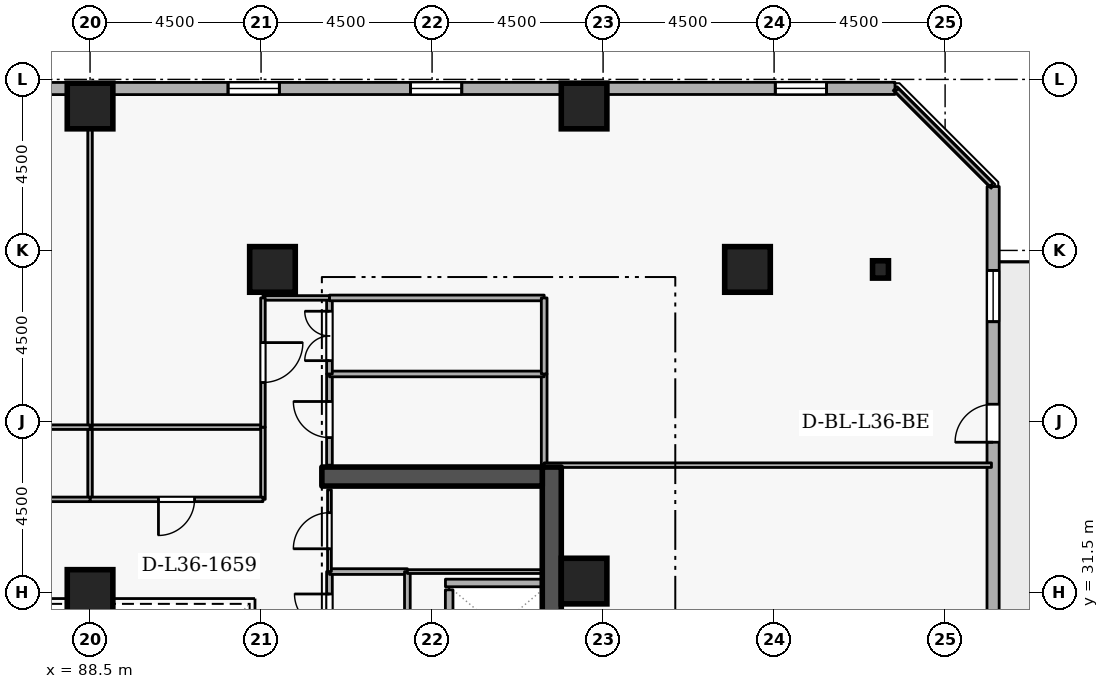
"""IFC4 building model, lengths in metres.
Left out: names, types, materials, properties, quantities, classifications, styles, units other than length and angle.
Written with IfcOpenShell. Run it as: python <this file> out.ifc"""

import sys

from ifc_helpers import new_model, si_unit, direction, frame, frame_2d, origin, origin_2d, place, context, subcontext, project, spatial, rectangle, i_section, extrude, element, fill, save


model = new_model("IFC4")
c1 = context("Model", 3, precision=1e-05, world=origin(), true_north=direction((0.0, 1.0)))
c2 = subcontext(c1, "Body", "Model", "MODEL_VIEW")
j1 = project(units=[si_unit("LENGTHUNIT", "METRE"), si_unit("PLANEANGLEUNIT", "RADIAN")], contexts=[c1])
p1 = place(None, origin())
s1 = spatial("IfcSite", under=j1, at=p1, CompositionType="ELEMENT")
p2 = place(p1, origin())
s2 = spatial("IfcBuilding", under=s1, at=p2, CompositionType="ELEMENT")
p3 = place(p2, frame((0.0, 0.0, 137.7)))
s3 = spatial("IfcBuildingStorey", under=s2, at=p3, CompositionType="ELEMENT", Elevation=137.7)
p4 = place(p3, frame((100.65, 19.2, 0.0), z_axis=(0.0, 0.0, 1.0), x_axis=(0.0, 1.0, 0.0)))
e1 = element("IfcWall", 1, at=p4, inside=s3, PredefinedType="SHEAR", context=c2, shape_type="SweptSolid", body=[
    extrude(rectangle(XDim=15.6, YDim=0.5, at=frame_2d((7.8, 0.0))), origin(), (0.0, 0.0, 1.0), 3.6),
])
p5 = place(p3, frame((94.6, 34.55, 0.0), z_axis=(0.0, 0.0, 1.0), x_axis=(1.0, 0.0, 0.0)))
e2 = element("IfcWall", 2, at=p5, inside=s3, PredefinedType="SHEAR", context=c2, shape_type="SweptSolid", body=[
    extrude(rectangle(XDim=5.8, YDim=0.5, at=frame_2d((2.9, 0.0))), origin(), (0.0, 0.0, 1.0), 3.6),
])
for number, where, z_axis, x_axis in (
    (3, (105.8, 40.0, 0.0), (0.0, 0.0, 1.0), (1.0, 0.0, 0.0)),
    (4, (101.5, 44.3, 0.0), (0.0, 0.0, 1.0), (1.0, 0.0, 0.0)),
    (5, (88.5, 44.3, 0.0), (0.0, 0.0, 1.0), (1.0, 0.0, 0.0)),
    (6, (93.3, 40.0, 0.0), (0.0, 0.0, 1.0), (1.0, 0.0, 0.0)),
    (7, (101.5, 31.8, 0.0), (0.0, 0.0, 1.0), (1.0, 0.0, 0.0)),
    (8, (88.5, 31.5, 0.0), (0.0, 0.0, 1.0), (1.0, 0.0, 0.0)),
):
    element("IfcColumn", number, at=place(p3, frame(where, z_axis=z_axis, x_axis=x_axis)), inside=s3, PredefinedType="COLUMN", context=c2, shape_type="SweptSolid", body=[
        extrude(rectangle(XDim=1.2, YDim=1.2, at=origin_2d()), origin(), (0.0, 0.0, 1.0), 3.6),
    ])
p6 = place(p3, frame((109.3, 40.0, 0.0), z_axis=(0.0, 0.0, 1.0), x_axis=(1.0, 0.0, 0.0)))
e9 = element("IfcColumn", 9, at=p6, inside=s3, PredefinedType="COLUMN", context=c2, shape_type="SweptSolid", body=[
    extrude(i_section(OverallWidth=0.418, OverallDepth=0.456, WebThickness=0.042, FlangeThickness=0.067, FilletRadius=0.015, at=origin_2d()), origin(), (0.0, 0.0, 1.0), 3.6),
])
p7 = place(p3, frame((112.257, 8.025, 0.0), z_axis=(0.0, 0.0, 1.0), x_axis=(0.000214431216, 0.99999997701, 0.0)))
e10 = element("IfcWall", 10, at=p7, inside=s3, PredefinedType="STANDARD", context=c2, shape_type="SweptSolid", body=[
    extrude(rectangle(XDim=34.156, YDim=0.32, at=frame_2d((17.078, 0.0))), origin(), (0.0, 0.0, 1.0), 2.66),
])
p8 = place(p7, frame((27.428, 0.0, 0.0)))
e11 = element("IfcOpeningElement", 11, at=p8, cuts=e10, PredefinedType="OPENING", context=c2, shape_type="SweptSolid", body=[
    extrude(rectangle(XDim=1.0, YDim=2.08, at=frame_2d((0.5, 1.04))), frame((0.0, 0.17, 0.0), z_axis=(0.0, -1.0, 0.0), x_axis=(1.0, 0.0, 0.0)), (0.0, 0.0, 1.0), 0.34),
])
p9 = place(p7, frame((1.8, 0.0, 0.72)))
e12 = element("IfcOpeningElement", 12, at=p9, cuts=e10, PredefinedType="OPENING", context=c2, shape_type="SweptSolid", body=[
    extrude(rectangle(XDim=1.35, YDim=1.05, at=frame_2d((0.675, 0.525))), frame((0.0, 0.17, 0.0), z_axis=(0.0, -1.0, 0.0), x_axis=(1.0, 0.0, 0.0)), (0.0, 0.0, 1.0), 0.34),
])
p10 = place(p7, frame((6.6, 0.0, 0.72)))
e13 = element("IfcOpeningElement", 13, at=p10, cuts=e10, PredefinedType="OPENING", context=c2, shape_type="SweptSolid", body=[
    extrude(rectangle(XDim=1.35, YDim=1.05, at=frame_2d((0.675, 0.525))), frame((0.0, 0.17, 0.0), z_axis=(0.0, -1.0, 0.0), x_axis=(1.0, 0.0, 0.0)), (0.0, 0.0, 1.0), 0.34),
])
p11 = place(p7, frame((11.4, 0.0, 0.72)))
e14 = element("IfcOpeningElement", 14, at=p11, cuts=e10, PredefinedType="OPENING", context=c2, shape_type="SweptSolid", body=[
    extrude(rectangle(XDim=1.35, YDim=1.05, at=frame_2d((0.675, 0.525))), frame((0.0, 0.17, 0.0), z_axis=(0.0, -1.0, 0.0), x_axis=(1.0, 0.0, 0.0)), (0.0, 0.0, 1.0), 0.34),
])
p12 = place(p7, frame((16.2, 0.0, 0.72)))
e15 = element("IfcOpeningElement", 15, at=p12, cuts=e10, PredefinedType="OPENING", context=c2, shape_type="SweptSolid", body=[
    extrude(rectangle(XDim=1.35, YDim=1.05, at=frame_2d((0.675, 0.525))), frame((0.0, 0.17, 0.0), z_axis=(0.0, -1.0, 0.0), x_axis=(1.0, 0.0, 0.0)), (0.0, 0.0, 1.0), 0.34),
])
p13 = place(p7, frame((21.0, 0.0, 0.72)))
e16 = element("IfcOpeningElement", 16, at=p13, cuts=e10, PredefinedType="OPENING", context=c2, shape_type="SweptSolid", body=[
    extrude(rectangle(XDim=1.35, YDim=1.05, at=frame_2d((0.675, 0.525))), frame((0.0, 0.17, 0.0), z_axis=(0.0, -1.0, 0.0), x_axis=(1.0, 0.0, 0.0)), (0.0, 0.0, 1.0), 0.34),
])
p14 = place(p7, frame((30.6, 0.0, 0.72)))
e17 = element("IfcOpeningElement", 17, at=p14, cuts=e10, PredefinedType="OPENING", context=c2, shape_type="SweptSolid", body=[
    extrude(rectangle(XDim=1.35, YDim=1.05, at=frame_2d((0.675, 0.525))), frame((0.0, 0.17, 0.0), z_axis=(0.0, -1.0, 0.0), x_axis=(1.0, 0.0, 0.0)), (0.0, 0.0, 1.0), 0.34),
])
p15 = place(p3, frame((109.681, 44.765, 0.0), z_axis=(0.0, 0.0, 1.0), x_axis=(-0.99999997701, -0.000214431216, 0.0)))
e18 = element("IfcWall", 18, at=p15, inside=s3, PredefinedType="STANDARD", context=c2, shape_type="SweptSolid", body=[
    extrude(rectangle(XDim=34.156, YDim=0.32, at=frame_2d((17.078, 0.0))), origin(), (0.0, 0.0, 1.0), 2.66),
])
p16 = place(p15, frame((1.8, 0.0, 0.72)))
e19 = element("IfcOpeningElement", 19, at=p16, cuts=e18, PredefinedType="OPENING", context=c2, shape_type="SweptSolid", body=[
    extrude(rectangle(XDim=1.35, YDim=1.05, at=frame_2d((0.675, 0.525))), frame((0.0, 0.17, 0.0), z_axis=(0.0, -1.0, 0.0), x_axis=(1.0, 0.0, 0.0)), (0.0, 0.0, 1.0), 0.34),
])
p17 = place(p15, frame((11.4, 0.0, 0.72)))
e20 = element("IfcOpeningElement", 20, at=p17, cuts=e18, PredefinedType="OPENING", context=c2, shape_type="SweptSolid", body=[
    extrude(rectangle(XDim=1.35, YDim=1.05, at=frame_2d((0.675, 0.525))), frame((0.0, 0.17, 0.0), z_axis=(0.0, -1.0, 0.0), x_axis=(1.0, 0.0, 0.0)), (0.0, 0.0, 1.0), 0.34),
])
p18 = place(p15, frame((16.2, 0.0, 0.72)))
e21 = element("IfcOpeningElement", 21, at=p18, cuts=e18, PredefinedType="OPENING", context=c2, shape_type="SweptSolid", body=[
    extrude(rectangle(XDim=1.35, YDim=1.05, at=frame_2d((0.675, 0.525))), frame((0.0, 0.17, 0.0), z_axis=(0.0, -1.0, 0.0), x_axis=(1.0, 0.0, 0.0)), (0.0, 0.0, 1.0), 0.34),
])
p19 = place(p15, frame((25.8, 0.0, 0.72)))
e22 = element("IfcOpeningElement", 22, at=p19, cuts=e18, PredefinedType="OPENING", context=c2, shape_type="SweptSolid", body=[
    extrude(rectangle(XDim=1.35, YDim=1.05, at=frame_2d((0.675, 0.525))), frame((0.0, 0.17, 0.0), z_axis=(0.0, -1.0, 0.0), x_axis=(1.0, 0.0, 0.0)), (0.0, 0.0, 1.0), 0.34),
])
p20 = place(p15, frame((30.6, 0.0, 0.72)))
e23 = element("IfcOpeningElement", 23, at=p20, cuts=e18, PredefinedType="OPENING", context=c2, shape_type="SweptSolid", body=[
    extrude(rectangle(XDim=1.35, YDim=1.05, at=frame_2d((0.675, 0.525))), frame((0.0, 0.17, 0.0), z_axis=(0.0, -1.0, 0.0), x_axis=(1.0, 0.0, 0.0)), (0.0, 0.0, 1.0), 0.34),
])
p21 = place(p3, frame((97.95, 31.57, 0.0), z_axis=(0.0, 0.0, 1.0), x_axis=(0.0, -1.0, 0.0)))
e24 = element("IfcWall", 24, at=p21, inside=s3, PredefinedType="STANDARD", context=c2, shape_type="SweptSolid", body=[
    extrude(rectangle(XDim=1.99, YDim=0.2, at=frame_2d((0.995, 0.0))), origin(), (0.0, 0.0, 1.0), 3.26),
])
p22 = place(p3, frame((97.852, 31.75, 0.0), z_axis=(0.0, 0.0, 1.0), x_axis=(1.0, 0.0, 0.0)))
e25 = element("IfcWall", 25, at=p22, inside=s3, PredefinedType="STANDARD", context=c2, shape_type="SweptSolid", body=[
    extrude(rectangle(XDim=2.536, YDim=0.2, at=frame_2d((1.268, 0.0))), origin(), (0.0, 0.0, 1.0), 3.26),
])
p23 = place(p3, frame((94.8, 29.95, 0.0), z_axis=(0.0, 0.0, 1.0), x_axis=(0.0, 1.0, 0.0)))
e26 = element("IfcWall", 26, at=p23, inside=s3, PredefinedType="PARTITIONING", context=c2, shape_type="SweptSolid", body=[
    extrude(rectangle(XDim=2.1, YDim=0.15, at=frame_2d((1.05, 0.0))), origin(), (0.0, 0.0, 1.0), 3.26),
])
p24 = place(p23, frame((0.59, 0.0, 0.0)))
e27 = element("IfcOpeningElement", 27, at=p24, cuts=e26, PredefinedType="OPENING", context=c2, shape_type="SweptSolid", body=[
    extrude(rectangle(XDim=0.92, YDim=2.08, at=frame_2d((0.46, 1.04))), frame((0.0, 0.085, 0.0), z_axis=(0.0, -1.0, 0.0), x_axis=(1.0, 0.0, 0.0)), (0.0, 0.0, 1.0), 0.17),
])
p25 = place(p3, frame((94.8, 32.05, 0.0), z_axis=(0.0, 0.0, 1.0), x_axis=(1.0, 0.0, 0.0)))
e28 = element("IfcWall", 28, at=p25, inside=s3, PredefinedType="PARTITIONING", context=c2, shape_type="SweptSolid", body=[
    extrude(rectangle(XDim=2.05, YDim=0.15, at=frame_2d((1.025, 0.0))), origin(), (0.0, 0.0, 1.0), 3.26),
])
p26 = place(p3, frame((96.85, 32.05, 0.0), z_axis=(0.0, 0.0, 1.0), x_axis=(0.0, -1.0, 0.0)))
e29 = element("IfcWall", 29, at=p26, inside=s3, PredefinedType="PARTITIONING", context=c2, shape_type="SweptSolid", body=[
    extrude(rectangle(XDim=2.1, YDim=0.15, at=frame_2d((1.05, 0.0))), origin(), (0.0, 0.0, 1.0), 3.26),
])
p27 = place(p3, frame((94.8, 32.05, 0.0), z_axis=(0.0, 0.0, 1.0), x_axis=(0.0, 1.0, 0.0)))
e30 = element("IfcWall", 30, at=p27, inside=s3, PredefinedType="PARTITIONING", context=c2, shape_type="SweptSolid", body=[
    extrude(rectangle(XDim=2.15, YDim=0.1, at=frame_2d((1.075, 0.0))), origin(), (0.0, 0.0, 1.0), 3.26),
])
p28 = place(p27, frame((0.6, 0.0, 0.0)))
e31 = element("IfcOpeningElement", 31, at=p28, cuts=e30, PredefinedType="OPENING", context=c2, shape_type="SweptSolid", body=[
    extrude(rectangle(XDim=0.95, YDim=2.1, at=frame_2d((0.475, 1.05))), frame((0.0, 0.06, 0.0), z_axis=(0.0, -1.0, 0.0), x_axis=(1.0, 0.0, 0.0)), (0.0, 0.0, 1.0), 0.12),
])
p29 = place(p3, frame((100.4, 32.05, 0.0), z_axis=(0.0, 0.0, 1.0), x_axis=(-1.0, 0.0, 0.0)))
e32 = element("IfcWall", 32, at=p29, inside=s3, PredefinedType="PARTITIONING", context=c2, shape_type="SweptSolid", body=[
    extrude(rectangle(XDim=3.55, YDim=0.1, at=frame_2d((1.775, 0.0))), origin(), (0.0, 0.0, 1.0), 3.26),
])
p30 = place(p3, frame((100.45, 37.25, 0.0), z_axis=(0.0, 0.0, 1.0), x_axis=(0.0, -1.0, 0.0)))
e33 = element("IfcWall", 33, at=p30, inside=s3, PredefinedType="PARTITIONING", context=c2, shape_type="SweptSolid", body=[
    extrude(rectangle(XDim=2.4, YDim=0.15, at=frame_2d((1.2, 0.0))), origin(), (0.0, 0.0, 1.0), 3.26),
])
p31 = place(p3, frame((94.8, 34.85, 0.0), z_axis=(0.0, 0.0, 1.0), x_axis=(0.0, 1.0, 0.0)))
e34 = element("IfcWall", 34, at=p31, inside=s3, PredefinedType="PARTITIONING", context=c2, shape_type="SweptSolid", body=[
    extrude(rectangle(XDim=2.4, YDim=0.15, at=frame_2d((1.2, 0.0))), origin(), (0.0, 0.0, 1.0), 3.26),
])
p32 = place(p31, frame((0.725, 0.0, 0.0)))
e35 = element("IfcOpeningElement", 35, at=p32, cuts=e34, PredefinedType="OPENING", context=c2, shape_type="SweptSolid", body=[
    extrude(rectangle(XDim=0.95, YDim=2.1, at=frame_2d((0.475, 1.05))), frame((0.0, 0.085, 0.0), z_axis=(0.0, -1.0, 0.0), x_axis=(1.0, 0.0, 0.0)), (0.0, 0.0, 1.0), 0.17),
])
p33 = place(p3, frame((94.8, 37.25, 0.0), z_axis=(0.0, 0.0, 1.0), x_axis=(1.0, 0.0, 0.0)))
e36 = element("IfcWall", 36, at=p33, inside=s3, PredefinedType="PARTITIONING", context=c2, shape_type="SweptSolid", body=[
    extrude(rectangle(XDim=5.65, YDim=0.15, at=frame_2d((2.825, 0.0))), origin(), (0.0, 0.0, 1.0), 3.26),
])
p34 = place(p3, frame((94.8, 37.25, 0.0), z_axis=(0.0, 0.0, 1.0), x_axis=(0.0, 1.0, 0.0)))
e37 = element("IfcWall", 37, at=p34, inside=s3, PredefinedType="PARTITIONING", context=c2, shape_type="SweptSolid", body=[
    extrude(rectangle(XDim=2.0, YDim=0.15, at=frame_2d((1.0, 0.0))), origin(), (0.0, 0.0, 1.0), 3.26),
])
p35 = place(p34, frame((0.35, 0.0, 0.0)))
e38 = element("IfcOpeningElement", 38, at=p35, cuts=e37, PredefinedType="OPENING", context=c2, shape_type="SweptSolid", body=[
    extrude(rectangle(XDim=1.3, YDim=2.12, at=frame_2d((0.65, 1.06))), frame((0.0, 0.085, 0.0), z_axis=(0.0, -1.0, 0.0), x_axis=(1.0, 0.0, 0.0)), (0.0, 0.0, 1.0), 0.17),
])
p36 = place(p3, frame((94.8, 39.25, 0.0), z_axis=(0.0, 0.0, 1.0), x_axis=(1.0, 0.0, 0.0)))
e39 = element("IfcWall", 39, at=p36, inside=s3, PredefinedType="PARTITIONING", context=c2, shape_type="SweptSolid", body=[
    extrude(rectangle(XDim=5.65, YDim=0.15, at=frame_2d((2.825, 0.0))), origin(), (0.0, 0.0, 1.0), 3.26),
])
p37 = place(p3, frame((100.45, 39.25, 0.0), z_axis=(0.0, 0.0, 1.0), x_axis=(0.0, -1.0, 0.0)))
e40 = element("IfcWall", 40, at=p37, inside=s3, PredefinedType="PARTITIONING", context=c2, shape_type="SweptSolid", body=[
    extrude(rectangle(XDim=2.0, YDim=0.15, at=frame_2d((1.0, 0.0))), origin(), (0.0, 0.0, 1.0), 3.26),
])
p38 = place(p3, frame((88.5, 33.95, 0.0), z_axis=(0.0, 0.0, 1.0), x_axis=(0.0, 1.0, 0.0)))
e41 = element("IfcWall", 41, at=p38, inside=s3, PredefinedType="PARTITIONING", context=c2, shape_type="SweptSolid", body=[
    extrude(rectangle(XDim=1.9, YDim=0.12, at=frame_2d((0.95, 0.0))), origin(), (0.0, 0.0, 1.0), 2.802),
])
p39 = place(p3, frame((88.5, 35.85, 0.0), z_axis=(0.0, 0.0, 1.0), x_axis=(1.0, 0.0, 0.0)))
e42 = element("IfcWall", 42, at=p39, inside=s3, PredefinedType="PARTITIONING", context=c2, shape_type="SweptSolid", body=[
    extrude(rectangle(XDim=4.55, YDim=0.12, at=frame_2d((2.275, 0.0))), origin(), (0.0, 0.0, 1.0), 3.26),
])
p40 = place(p3, frame((93.05, 35.85, 0.0), z_axis=(0.0, 0.0, 1.0), x_axis=(0.0, -1.0, 0.0)))
e43 = element("IfcWall", 43, at=p40, inside=s3, PredefinedType="PARTITIONING", context=c2, shape_type="SweptSolid", body=[
    extrude(rectangle(XDim=1.9, YDim=0.12, at=frame_2d((0.95, 0.0))), origin(), (0.0, 0.0, 1.0), 3.26),
])
p41 = place(p3, frame((93.05, 33.95, 0.0), z_axis=(0.0, 0.0, 1.0), x_axis=(-1.0, 0.0, 0.0)))
e44 = element("IfcWall", 44, at=p41, inside=s3, PredefinedType="PARTITIONING", context=c2, shape_type="SweptSolid", body=[
    extrude(rectangle(XDim=4.55, YDim=0.12, at=frame_2d((2.275, 0.0))), origin(), (0.0, 0.0, 1.0), 3.26),
])
p42 = place(p41, frame((1.8, 0.0, 0.0)))
e45 = element("IfcOpeningElement", 45, at=p42, cuts=e44, PredefinedType="OPENING", context=c2, shape_type="SweptSolid", body=[
    extrude(rectangle(XDim=0.95, YDim=2.1, at=frame_2d((0.475, 1.05))), frame((0.0, 0.07, 0.0), z_axis=(0.0, -1.0, 0.0), x_axis=(1.0, 0.0, 0.0)), (0.0, 0.0, 1.0), 0.14),
])
p43 = place(p3, frame((94.8, 39.25, 0.0), z_axis=(0.0, 0.0, 1.0), x_axis=(-1.0, 0.0, 0.0)))
e46 = element("IfcWall", 46, at=p43, inside=s3, PredefinedType="PARTITIONING", context=c2, shape_type="SweptSolid", body=[
    extrude(rectangle(XDim=1.75, YDim=0.12, at=frame_2d((0.875, 0.0))), origin(), (0.0, 0.0, 1.0), 3.26),
])
p44 = place(p3, frame((93.05, 39.25, 0.0), z_axis=(0.0, 0.0, 1.0), x_axis=(0.0, -1.0, 0.0)))
e47 = element("IfcWall", 47, at=p44, inside=s3, PredefinedType="PARTITIONING", context=c2, shape_type="SweptSolid", body=[
    extrude(rectangle(XDim=3.4, YDim=0.12, at=frame_2d((1.7, 0.0))), origin(), (0.0, 0.0, 1.0), 3.26),
])
p45 = place(p44, frame((1.175, 0.0, 0.0)))
e48 = element("IfcOpeningElement", 48, at=p45, cuts=e47, PredefinedType="OPENING", context=c2, shape_type="SweptSolid", body=[
    extrude(rectangle(XDim=1.05, YDim=2.1, at=frame_2d((0.525, 1.05))), frame((0.0, 0.07, 0.0), z_axis=(0.0, -1.0, 0.0), x_axis=(1.0, 0.0, 0.0)), (0.0, 0.0, 1.0), 0.14),
])
p46 = place(p3, frame((88.5, 35.85, 0.0), z_axis=(0.0, 0.0, 1.0), x_axis=(0.0, 1.0, 0.0)))
e49 = element("IfcWall", 49, at=p46, inside=s3, PredefinedType="PARTITIONING", context=c2, shape_type="SweptSolid", body=[
    extrude(rectangle(XDim=8.87, YDim=0.12, at=frame_2d((4.435, 0.0))), origin(), (0.0, 0.0, 1.0), 2.802),
])
p47 = place(p3, frame((109.725, 44.72, 0.0), z_axis=(0.0, 0.0, 1.0), x_axis=(0.707106781187, -0.707106781187, 0.0)))
e50 = element("IfcWall", 50, at=p47, inside=s3, PredefinedType="PARTITIONING", context=c2, shape_type="SweptSolid", body=[
    extrude(rectangle(XDim=3.528, YDim=0.12, at=frame_2d((1.764, 0.0))), origin(), (0.0, 0.0, 1.0), 3.26),
])
p48 = place(p3, frame((112.22, 34.85, 0.0), z_axis=(0.0, 0.0, 1.0), x_axis=(-1.0, 0.0, 0.0)))
e51 = element("IfcWall", 51, at=p48, inside=s3, PredefinedType="PARTITIONING", context=c2, shape_type="SweptSolid", body=[
    extrude(rectangle(XDim=11.77, YDim=0.12, at=frame_2d((5.885, 0.0))), origin(), (0.0, 0.0, 1.0), 2.465),
])
p49 = place(p3, frame((83.95, 35.85, 0.0), z_axis=(0.0, 0.0, 1.0), x_axis=(1.0, 0.0, 0.0)))
e52 = element("IfcWall", 52, at=p49, inside=s3, PredefinedType="PARTITIONING", context=c2, shape_type="SweptSolid", body=[
    extrude(rectangle(XDim=4.55, YDim=0.12, at=frame_2d((2.275, 0.0))), origin(), (0.0, 0.0, 1.0), 3.26),
])
p50 = place(p3, frame((88.5, 33.95, 0.0), z_axis=(0.0, 0.0, 1.0), x_axis=(-1.0, 0.0, 0.0)))
e53 = element("IfcWall", 53, at=p50, inside=s3, PredefinedType="PARTITIONING", context=c2, shape_type="SweptSolid", body=[
    extrude(rectangle(XDim=4.55, YDim=0.12, at=frame_2d((2.275, 0.0))), origin(), (0.0, 0.0, 1.0), 3.26),
])
p51 = place(p50, frame((1.8, 0.0, 0.0)))
e54 = element("IfcOpeningElement", 54, at=p51, cuts=e53, PredefinedType="OPENING", context=c2, shape_type="SweptSolid", body=[
    extrude(rectangle(XDim=0.95, YDim=2.1, at=frame_2d((0.475, 1.05))), frame((0.0, 0.07, 0.0), z_axis=(0.0, -1.0, 0.0), x_axis=(1.0, 0.0, 0.0)), (0.0, 0.0, 1.0), 0.14),
])
p52 = place(p8, origin())
e55 = element("IfcDoor", 55, at=p52, inside=s3, OperationType="SINGLE_SWING_LEFT", PredefinedType="DOOR", context=c2, shape_type="SweptSolid", body=[
    extrude(rectangle(XDim=1.0, YDim=2.08, at=frame_2d((0.5, 1.04))), frame((0.0, 0.025, 0.0), z_axis=(0.0, -1.0, 0.0), x_axis=(1.0, 0.0, 0.0)), (0.0, 0.0, 1.0), 0.05),
])
fill(e11, e55)
p53 = place(p14, origin())
e56 = element("IfcWindow", 56, at=p53, inside=s3, PartitioningType="SINGLE_PANEL", PredefinedType="WINDOW", context=c2, shape_type="SweptSolid", body=[
    extrude(rectangle(XDim=1.35, YDim=1.05, at=frame_2d((0.675, 0.525))), frame((0.0, 0.03, 0.0), z_axis=(0.0, -1.0, 0.0), x_axis=(1.0, 0.0, 0.0)), (0.0, 0.0, 1.0), 0.06),
])
fill(e17, e56)
p54 = place(p16, origin())
e57 = element("IfcWindow", 57, at=p54, inside=s3, PartitioningType="SINGLE_PANEL", PredefinedType="WINDOW", context=c2, shape_type="SweptSolid", body=[
    extrude(rectangle(XDim=1.35, YDim=1.05, at=frame_2d((0.675, 0.525))), frame((0.0, 0.03, 0.0), z_axis=(0.0, -1.0, 0.0), x_axis=(1.0, 0.0, 0.0)), (0.0, 0.0, 1.0), 0.06),
])
fill(e19, e57)
p55 = place(p17, origin())
e58 = element("IfcWindow", 58, at=p55, inside=s3, PartitioningType="SINGLE_PANEL", PredefinedType="WINDOW", context=c2, shape_type="SweptSolid", body=[
    extrude(rectangle(XDim=1.35, YDim=1.05, at=frame_2d((0.675, 0.525))), frame((0.0, 0.03, 0.0), z_axis=(0.0, -1.0, 0.0), x_axis=(1.0, 0.0, 0.0)), (0.0, 0.0, 1.0), 0.06),
])
fill(e20, e58)
p56 = place(p18, origin())
e59 = element("IfcWindow", 59, at=p56, inside=s3, PartitioningType="SINGLE_PANEL", PredefinedType="WINDOW", context=c2, shape_type="SweptSolid", body=[
    extrude(rectangle(XDim=1.35, YDim=1.05, at=frame_2d((0.675, 0.525))), frame((0.0, 0.03, 0.0), z_axis=(0.0, -1.0, 0.0), x_axis=(1.0, 0.0, 0.0)), (0.0, 0.0, 1.0), 0.06),
])
fill(e21, e59)
p57 = place(p24, origin())
e60 = element("IfcDoor", 60, at=p57, inside=s3, OperationType="SINGLE_SWING_RIGHT", PredefinedType="DOOR", context=c2, shape_type="SweptSolid", body=[
    extrude(rectangle(XDim=0.92, YDim=2.08, at=frame_2d((0.46, 1.04))), frame((0.0, 0.025, 0.0), z_axis=(0.0, -1.0, 0.0), x_axis=(1.0, 0.0, 0.0)), (0.0, 0.0, 1.0), 0.05),
])
fill(e27, e60)
p58 = place(p28, origin())
e61 = element("IfcDoor", 61, at=p58, inside=s3, OperationType="SINGLE_SWING_LEFT", PredefinedType="DOOR", context=c2, shape_type="SweptSolid", body=[
    extrude(rectangle(XDim=0.95, YDim=2.1, at=frame_2d((0.475, 1.05))), frame((0.0, 0.025, 0.0), z_axis=(0.0, -1.0, 0.0), x_axis=(1.0, 0.0, 0.0)), (0.0, 0.0, 1.0), 0.05),
])
fill(e31, e61)
p59 = place(p32, origin())
e62 = element("IfcDoor", 62, at=p59, inside=s3, OperationType="SINGLE_SWING_RIGHT", PredefinedType="DOOR", context=c2, shape_type="SweptSolid", body=[
    extrude(rectangle(XDim=0.95, YDim=2.1, at=frame_2d((0.475, 1.05))), frame((0.0, 0.025, 0.0), z_axis=(0.0, -1.0, 0.0), x_axis=(1.0, 0.0, 0.0)), (0.0, 0.0, 1.0), 0.05),
])
fill(e35, e62)
p60 = place(p35, origin())
e63 = element("IfcDoor", 63, at=p60, inside=s3, OperationType="DOUBLE_DOOR_SINGLE_SWING", PredefinedType="DOOR", context=c2, shape_type="SweptSolid", body=[
    extrude(rectangle(XDim=1.3, YDim=2.12, at=frame_2d((0.65, 1.06))), frame((0.0, 0.025, 0.0), z_axis=(0.0, -1.0, 0.0), x_axis=(1.0, 0.0, 0.0)), (0.0, 0.0, 1.0), 0.05),
])
fill(e38, e63)
p61 = place(p42, origin())
e64 = element("IfcDoor", 64, at=p61, inside=s3, OperationType="SINGLE_SWING_RIGHT", PredefinedType="DOOR", context=c2, shape_type="SweptSolid", body=[
    extrude(rectangle(XDim=0.95, YDim=2.1, at=frame_2d((0.475, 1.05))), frame((0.0, 0.025, 0.0), z_axis=(0.0, -1.0, 0.0), x_axis=(1.0, 0.0, 0.0)), (0.0, 0.0, 1.0), 0.05),
])
fill(e45, e64)
p62 = place(p45, origin())
e65 = element("IfcDoor", 65, at=p62, inside=s3, OperationType="SINGLE_SWING_LEFT", PredefinedType="DOOR", context=c2, shape_type="SweptSolid", body=[
    extrude(rectangle(XDim=1.05, YDim=2.1, at=frame_2d((0.525, 1.05))), frame((0.0, 0.025, 0.0), z_axis=(0.0, -1.0, 0.0), x_axis=(1.0, 0.0, 0.0)), (0.0, 0.0, 1.0), 0.05),
])
fill(e48, e65)
save(model, sys.argv[1])
